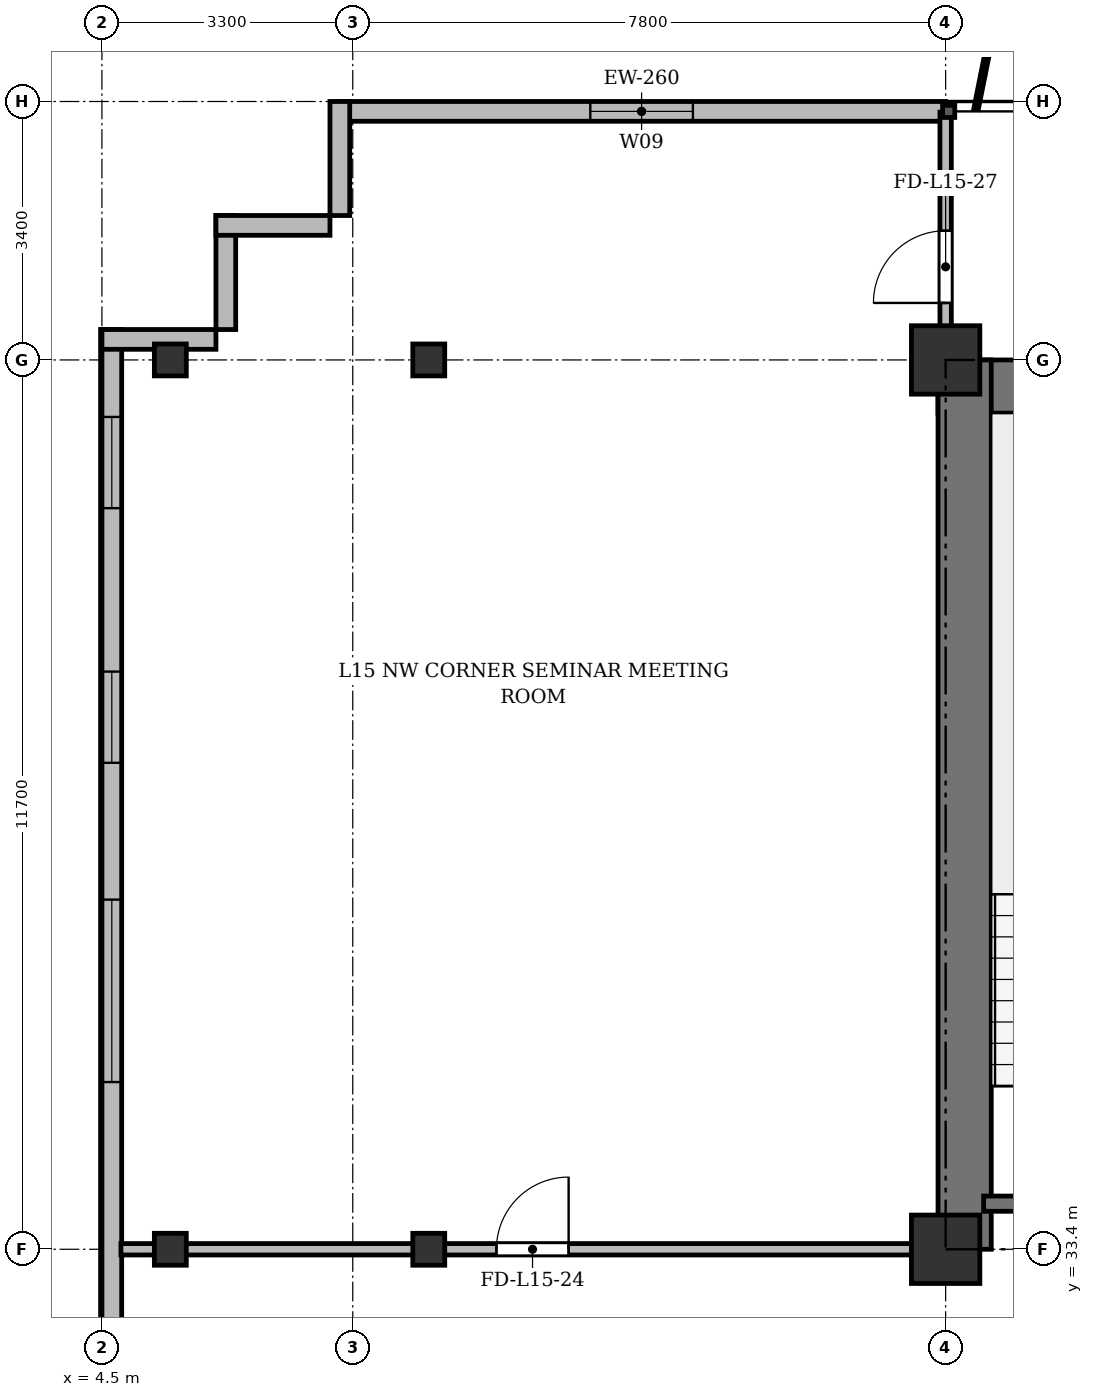
"""IFC4 building model, lengths in metres.
Left out: names, types, materials, properties, quantities, classifications, styles, units other than length and angle.
Written with IfcOpenShell. Run it as: python <this file> out.ifc"""

import sys

from ifc_helpers import new_model, si_unit, direction, frame, frame_2d, origin, origin_2d, place, context, subcontext, project, spatial, rectangle, i_section, extrude, source, transform, mapped, element, fill, save


model = new_model("IFC4")
c1 = context("Model", 3, precision=1e-05, world=origin(), true_north=direction((0.0, 1.0)))
c2 = subcontext(c1, "Body", "Model", "MODEL_VIEW")
j1 = project(units=[si_unit("LENGTHUNIT", "METRE"), si_unit("PLANEANGLEUNIT", "RADIAN")], contexts=[c1])
p1 = place(None, origin())
s1 = spatial("IfcSite", under=j1, at=p1, CompositionType="ELEMENT")
p2 = place(p1, origin())
s2 = spatial("IfcBuilding", under=s1, at=p2, CompositionType="ELEMENT")
p3 = place(p2, frame((0.0, 0.0, 59.5)))
s3 = spatial("IfcBuildingStorey", under=s2, at=p3, CompositionType="ELEMENT", Elevation=59.5)
m1 = source(origin(), c2, "Body", "SweptSolid", [
    extrude(i_section(OverallWidth=0.42, OverallDepth=0.42, WebThickness=0.026, FlangeThickness=0.04, at=origin_2d()), origin(), (0.0, 0.0, 1.0), 3.6),
])
for number, where, z_axis, x_axis in (
    (1, (5.4, 33.4, 0.0), (0.0, 0.0, 1.0), (1.0, 0.0, 0.0)),
    (2, (5.4, 45.1, 0.0), (0.0, 0.0, 1.0), (1.0, 0.0, 0.0)),
    (3, (8.8, 33.4, 0.0), (0.0, 0.0, 1.0), (1.0, 0.0, 0.0)),
    (4, (8.8, 45.1, 0.0), (0.0, 0.0, 1.0), (1.0, 0.0, 0.0)),
):
    element("IfcColumn", number, at=place(p3, frame(where, z_axis=z_axis, x_axis=x_axis)), inside=s3, PredefinedType="COLUMN", context=c2, shape_type="MappedRepresentation", body=[
        mapped(m1, transform((0.0, 0.0, 0.0), x_axis=(1.0, 0.0, 0.0), y_axis=(0.0, 1.0, 0.0), z_axis=(0.0, 0.0, 1.0), scale=1.0)),
    ])
m2 = source(origin(), c2, "Body", "SweptSolid", [
    extrude(rectangle(XDim=0.9, YDim=0.9, at=origin_2d()), origin(), (0.0, 0.0, 1.0), 3.6),
])
for number, where, z_axis, x_axis in (
    (5, (15.6, 33.4, 0.0), (0.0, 0.0, 1.0), (1.0, 0.0, 0.0)),
    (6, (15.6, 45.1, 0.0), (0.0, 0.0, 1.0), (1.0, 0.0, 0.0)),
):
    element("IfcColumn", number, at=place(p3, frame(where, z_axis=z_axis, x_axis=x_axis)), inside=s3, PredefinedType="COLUMN", context=c2, shape_type="MappedRepresentation", body=[
        mapped(m2, transform((0.0, 0.0, 0.0), x_axis=(1.0, 0.0, 0.0), y_axis=(0.0, 1.0, 0.0), z_axis=(0.0, 0.0, 1.0), scale=1.0)),
    ])
p4 = place(p3, frame((7.6, 48.37, 0.0), z_axis=(0.0, 0.0, 1.0), x_axis=(1.0, 0.0, 0.0)))
e7 = element("IfcWall", 7, at=p4, inside=s3, PredefinedType="SOLIDWALL", context=c2, shape_type="SweptSolid", body=[
    extrude(rectangle(XDim=8.0, YDim=0.26, at=frame_2d((4.0, 0.0))), origin(), (0.0, 0.0, 1.0), 3.34),
])
p5 = place(p4, frame((3.325, 0.0, 0.9)))
e8 = element("IfcOpeningElement", 8, at=p5, cuts=e7, PredefinedType="OPENING", context=c2, shape_type="SweptSolid", body=[
    extrude(rectangle(XDim=1.35, YDim=1.5, at=frame_2d((0.675, 0.75))), frame((0.0, 0.14, 0.0), z_axis=(0.0, -1.0, 0.0), x_axis=(1.0, 0.0, 0.0)), (0.0, 0.0, 1.0), 0.28),
])
p6 = place(p3, frame((4.63, 5.9, 0.0), z_axis=(0.0, 0.0, 1.0), x_axis=(0.0, 1.0, 0.0)))
e9 = element("IfcWall", 9, at=p6, inside=s3, PredefinedType="SOLIDWALL", context=c2, shape_type="SweptSolid", body=[
    extrude(rectangle(XDim=39.6, YDim=0.26, at=frame_2d((19.8, 0.0))), origin(), (0.0, 0.0, 1.0), 3.34),
])
p7 = place(p6, frame((1.45, 0.0, 0.92)))
e10 = element("IfcOpeningElement", 10, at=p7, cuts=e9, PredefinedType="OPENING", context=c2, shape_type="SweptSolid", body=[
    extrude(rectangle(XDim=1.2, YDim=1.65, at=frame_2d((0.6, 0.825))), frame((0.0, 0.14, 0.0), z_axis=(0.0, -1.0, 0.0), x_axis=(1.0, 0.0, 0.0)), (0.0, 0.0, 1.0), 0.28),
])
p8 = place(p6, frame((4.3, 0.0, 0.92)))
e11 = element("IfcOpeningElement", 11, at=p8, cuts=e9, PredefinedType="OPENING", context=c2, shape_type="SweptSolid", body=[
    extrude(rectangle(XDim=2.4, YDim=2.1, at=frame_2d((1.2, 1.05))), frame((0.0, 0.14, 0.0), z_axis=(0.0, -1.0, 0.0), x_axis=(1.0, 0.0, 0.0)), (0.0, 0.0, 1.0), 0.28),
])
p9 = place(p6, frame((8.5, 0.0, 0.92)))
e12 = element("IfcOpeningElement", 12, at=p9, cuts=e9, PredefinedType="OPENING", context=c2, shape_type="SweptSolid", body=[
    extrude(rectangle(XDim=2.4, YDim=2.1, at=frame_2d((1.2, 1.05))), frame((0.0, 0.14, 0.0), z_axis=(0.0, -1.0, 0.0), x_axis=(1.0, 0.0, 0.0)), (0.0, 0.0, 1.0), 0.28),
])
p10 = place(p6, frame((29.7, 0.0, 0.92)))
e13 = element("IfcOpeningElement", 13, at=p10, cuts=e9, PredefinedType="OPENING", context=c2, shape_type="SweptSolid", body=[
    extrude(rectangle(XDim=2.4, YDim=2.1, at=frame_2d((1.2, 1.05))), frame((0.0, 0.14, 0.0), z_axis=(0.0, -1.0, 0.0), x_axis=(1.0, 0.0, 0.0)), (0.0, 0.0, 1.0), 0.28),
])
p11 = place(p6, frame((33.9, 0.0, 0.92)))
e14 = element("IfcOpeningElement", 14, at=p11, cuts=e9, PredefinedType="OPENING", context=c2, shape_type="SweptSolid", body=[
    extrude(rectangle(XDim=1.2, YDim=1.65, at=frame_2d((0.6, 0.825))), frame((0.0, 0.14, 0.0), z_axis=(0.0, -1.0, 0.0), x_axis=(1.0, 0.0, 0.0)), (0.0, 0.0, 1.0), 0.28),
])
p12 = place(p6, frame((37.25, 0.0, 0.92)))
e15 = element("IfcOpeningElement", 15, at=p12, cuts=e9, PredefinedType="OPENING", context=c2, shape_type="SweptSolid", body=[
    extrude(rectangle(XDim=1.2, YDim=1.65, at=frame_2d((0.6, 0.825))), frame((0.0, 0.14, 0.0), z_axis=(0.0, -1.0, 0.0), x_axis=(1.0, 0.0, 0.0)), (0.0, 0.0, 1.0), 0.28),
])
p13 = place(p3, frame((4.5, 45.37, 0.0), z_axis=(0.0, 0.0, 1.0), x_axis=(1.0, 0.0, 0.0)))
e16 = element("IfcWall", 16, at=p13, inside=s3, PredefinedType="SOLIDWALL", context=c2, shape_type="SweptSolid", body=[
    extrude(rectangle(XDim=1.5, YDim=0.26, at=frame_2d((0.75, 0.0))), origin(), (0.0, 0.0, 1.0), 2.69),
])
for number, where, z_axis, x_axis in (
    (17, (6.13, 45.5, 0.0), (0.0, 0.0, 1.0), (0.0, 1.0, 0.0)),
    (18, (6.0, 46.87, 0.0), (0.0, 0.0, 1.0), (1.0, 0.0, 0.0)),
    (19, (7.63, 47.0, 0.0), (0.0, 0.0, 1.0), (0.0, 1.0, 0.0)),
):
    element("IfcWall", number, at=place(p3, frame(where, z_axis=z_axis, x_axis=x_axis)), inside=s3, PredefinedType="SOLIDWALL", context=c2, shape_type="SweptSolid", body=[
        extrude(rectangle(XDim=1.5, YDim=0.26, at=frame_2d((0.75, 0.0))), origin(), (0.0, 0.0, 1.0), 3.34),
    ])
p14 = place(p3, frame((15.5, 44.75, 0.0), z_axis=(0.0, 0.0, 1.0), x_axis=(1.0, 0.0, 0.0)))
e20 = element("IfcWall", 20, at=p14, inside=s3, PredefinedType="SHEAR", context=c2, shape_type="SweptSolid", body=[
    extrude(rectangle(XDim=43.4, YDim=0.7, at=frame_2d((21.7, 0.0))), origin(), (0.0, 0.0, 1.0), 3.34),
])
p15 = place(p3, frame((15.85, 33.4, 0.0), z_axis=(0.0, 0.0, 1.0), x_axis=(0.0, 1.0, 0.0)))
e21 = element("IfcWall", 21, at=p15, inside=s3, PredefinedType="SHEAR", context=c2, shape_type="SweptSolid", body=[
    extrude(rectangle(XDim=11.7, YDim=0.7, at=frame_2d((5.85, 0.0))), origin(), (0.0, 0.0, 1.0), 3.34),
])
p16 = place(p3, frame((16.1, 34.0, 0.0), z_axis=(0.0, 0.0, 1.0), x_axis=(1.0, 0.0, 0.0)))
e22 = element("IfcWall", 22, at=p16, inside=s3, PredefinedType="SHEAR", context=c2, shape_type="SweptSolid", body=[
    extrude(rectangle(XDim=3.4, YDim=0.2, at=frame_2d((1.7, 0.0))), origin(), (0.0, 0.0, 1.0), 3.34),
])
p17 = place(p3, frame((4.75, 33.4, 0.0), z_axis=(0.0, 0.0, 1.0), x_axis=(1.0, 0.0, 0.0)))
e23 = element("IfcWall", 23, at=p17, inside=s3, PredefinedType="PARTITIONING", context=c2, shape_type="SweptSolid", body=[
    extrude(rectangle(XDim=10.85, YDim=0.15, at=frame_2d((5.425, 0.0))), origin(), (0.0, 0.0, 1.0), 2.69),
])
p18 = place(p17, frame((4.94, 0.0, 0.0)))
e24 = element("IfcOpeningElement", 24, at=p18, cuts=e23, PredefinedType="OPENING", context=c2, shape_type="SweptSolid", body=[
    extrude(rectangle(XDim=0.95, YDim=2.15, at=frame_2d((0.475, 1.075))), frame((0.0, 0.085, 0.0), z_axis=(0.0, -1.0, 0.0), x_axis=(1.0, 0.0, 0.0)), (0.0, 0.0, 1.0), 0.17),
])
p19 = place(p3, frame((15.6, 44.75, 0.0), z_axis=(0.0, 0.0, 1.0), x_axis=(0.0, 1.0, 0.0)))
e25 = element("IfcWall", 25, at=p19, inside=s3, PredefinedType="PARTITIONING", context=c2, shape_type="SweptSolid", body=[
    extrude(rectangle(XDim=3.61, YDim=0.15, at=frame_2d((1.805, 0.0))), origin(), (0.0, 0.0, 1.0), 2.752),
])
p20 = place(p19, frame((1.1, 0.0, 0.0)))
e26 = element("IfcOpeningElement", 26, at=p20, cuts=e25, PredefinedType="OPENING", context=c2, shape_type="SweptSolid", body=[
    extrude(rectangle(XDim=0.95, YDim=2.15, at=frame_2d((0.475, 1.075))), frame((0.0, 0.085, 0.0), z_axis=(0.0, -1.0, 0.0), x_axis=(1.0, 0.0, 0.0)), (0.0, 0.0, 1.0), 0.17),
])
m3 = source(origin(), c2, "Body", "SweptSolid", [
    extrude(rectangle(XDim=1.35, YDim=1.5, at=frame_2d((0.675, 0.75))), frame((0.0, 0.03, 0.0), z_axis=(0.0, -1.0, 0.0), x_axis=(1.0, 0.0, 0.0)), (0.0, 0.0, 1.0), 0.06),
])
p21 = place(p5, origin())
e27 = element("IfcWindow", 27, at=p21, inside=s3, PartitioningType="SINGLE_PANEL", PredefinedType="WINDOW", context=c2, shape_type="MappedRepresentation", body=[
    mapped(m3, transform((0.0, 0.0, 0.0), x_axis=(1.0, 0.0, 0.0), y_axis=(0.0, 1.0, 0.0), z_axis=(0.0, 0.0, 1.0), scale=1.0)),
])
fill(e8, e27)
m4 = source(origin(), c2, "Body", "SweptSolid", [
    extrude(rectangle(XDim=2.4, YDim=2.1, at=frame_2d((1.2, 1.05))), frame((0.0, 0.03, 0.0), z_axis=(0.0, -1.0, 0.0), x_axis=(1.0, 0.0, 0.0)), (0.0, 0.0, 1.0), 0.06),
])
p22 = place(p10, origin())
e28 = element("IfcWindow", 28, at=p22, inside=s3, PartitioningType="SINGLE_PANEL", PredefinedType="WINDOW", context=c2, shape_type="MappedRepresentation", body=[
    mapped(m4, transform((0.0, 0.0, 0.0), x_axis=(1.0, 0.0, 0.0), y_axis=(0.0, 1.0, 0.0), z_axis=(0.0, 0.0, 1.0), scale=1.0)),
])
fill(e13, e28)
m5 = source(origin(), c2, "Body", "SweptSolid", [
    extrude(rectangle(XDim=1.2, YDim=1.65, at=frame_2d((0.6, 0.825))), frame((0.0, 0.03, 0.0), z_axis=(0.0, -1.0, 0.0), x_axis=(1.0, 0.0, 0.0)), (0.0, 0.0, 1.0), 0.06),
])
p23 = place(p11, origin())
e29 = element("IfcWindow", 29, at=p23, inside=s3, PartitioningType="SINGLE_PANEL", PredefinedType="WINDOW", context=c2, shape_type="MappedRepresentation", body=[
    mapped(m5, transform((0.0, 0.0, 0.0), x_axis=(1.0, 0.0, 0.0), y_axis=(0.0, 1.0, 0.0), z_axis=(0.0, 0.0, 1.0), scale=1.0)),
])
fill(e14, e29)
p24 = place(p12, origin())
e30 = element("IfcWindow", 30, at=p24, inside=s3, PartitioningType="SINGLE_PANEL", PredefinedType="WINDOW", context=c2, shape_type="MappedRepresentation", body=[
    mapped(m5, transform((0.0, 0.0, 0.0), x_axis=(1.0, 0.0, 0.0), y_axis=(0.0, 1.0, 0.0), z_axis=(0.0, 0.0, 1.0), scale=1.0)),
])
fill(e15, e30)
m6 = source(origin(), c2, "Body", "SweptSolid", [
    extrude(rectangle(XDim=0.95, YDim=2.15, at=frame_2d((0.475, 1.075))), frame((0.0, 0.025, 0.0), z_axis=(0.0, -1.0, 0.0), x_axis=(1.0, 0.0, 0.0)), (0.0, 0.0, 1.0), 0.05),
])
p25 = place(p18, origin())
e31 = element("IfcDoor", 31, at=p25, inside=s3, OperationType="SINGLE_SWING_RIGHT", PredefinedType="DOOR", context=c2, shape_type="MappedRepresentation", body=[
    mapped(m6, transform((0.0, 0.0, 0.0), x_axis=(1.0, 0.0, 0.0), y_axis=(0.0, 1.0, 0.0), z_axis=(0.0, 0.0, 1.0), scale=1.0)),
])
fill(e24, e31)
p26 = place(p20, origin())
e32 = element("IfcDoor", 32, at=p26, inside=s3, OperationType="SINGLE_SWING_LEFT", PredefinedType="DOOR", context=c2, shape_type="MappedRepresentation", body=[
    mapped(m6, transform((0.0, 0.0, 0.0), x_axis=(1.0, 0.0, 0.0), y_axis=(0.0, 1.0, 0.0), z_axis=(0.0, 0.0, 1.0), scale=1.0)),
])
fill(e26, e32)
save(model, sys.argv[1])
